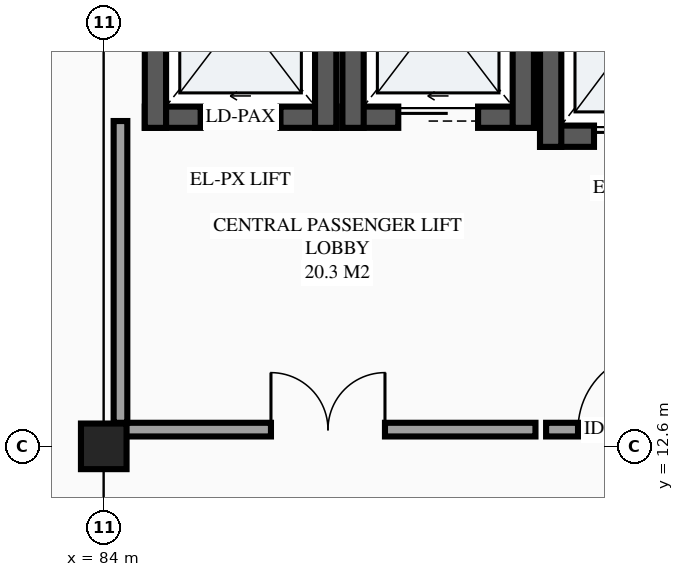
"""IFC4 building model, lengths in metres.
Left out: names, types, materials, properties, quantities, classifications, styles, units other than length and angle.
Written with IfcOpenShell. Run it as: python <this file> out.ifc"""

import sys

from ifc_helpers import new_model, si_unit, direction, frame, frame_2d, origin, origin_2d, place, context, subcontext, project, spatial, rectangle, extrude, element, fill, save


model = new_model("IFC4")
c1 = context("Model", 3, precision=1e-05, world=origin(), true_north=direction((0.0, 1.0)))
c2 = subcontext(c1, "Body", "Model", "MODEL_VIEW")
j1 = project(units=[si_unit("LENGTHUNIT", "METRE"), si_unit("PLANEANGLEUNIT", "RADIAN")], contexts=[c1])
p1 = place(None, origin())
s1 = spatial("IfcSite", under=j1, at=p1, CompositionType="ELEMENT")
p2 = place(p1, origin())
s2 = spatial("IfcBuilding", under=s1, at=p2, CompositionType="ELEMENT")
p3 = place(p2, frame((0.0, 0.0, 25.5)))
s3 = spatial("IfcBuildingStorey", under=s2, at=p3, CompositionType="ELEMENT", Elevation=25.5)
p4 = place(p3, frame((84.0, 12.6, 0.0), z_axis=(0.0, 0.0, 1.0), x_axis=(1.0, 0.0, 0.0)))
e1 = element("IfcColumn", 1, at=p4, inside=s3, PredefinedType="COLUMN", context=c2, shape_type="SweptSolid", body=[
    extrude(rectangle(XDim=0.6, YDim=0.6, at=origin_2d()), origin(), (0.0, 0.0, 1.0), 3.6),
])
p5 = place(p3, frame((84.54, 16.93, 0.0), z_axis=(0.0, 0.0, 1.0), x_axis=(1.0, 0.0, 0.0)))
e2 = element("IfcWall", 2, at=p5, inside=s3, PredefinedType="SHEAR", context=c2, shape_type="SweptSolid", body=[
    extrude(rectangle(XDim=2.52, YDim=0.28, at=frame_2d((1.26, 0.0))), origin(), (0.0, 0.0, 1.0), 3.6),
])
p6 = place(p5, frame((0.735, 0.0, 0.0)))
e3 = element("IfcOpeningElement", 3, at=p6, cuts=e2, PredefinedType="OPENING", context=c2, shape_type="SweptSolid", body=[
    extrude(rectangle(XDim=1.05, YDim=2.2, at=frame_2d((0.525, 1.1))), frame((0.0, 0.15, 0.0), z_axis=(0.0, -1.0, 0.0), x_axis=(1.0, 0.0, 0.0)), (0.0, 0.0, 1.0), 0.3),
])
for number, where, z_axis, x_axis in (
    (4, (86.92, 16.79, 0.0), (0.0, 0.0, 1.0), (0.0, 1.0, 0.0)),
    (5, (84.68, 19.81, 0.0), (0.0, 0.0, 1.0), (0.0, -1.0, 0.0)),
):
    element("IfcWall", number, at=place(p3, frame(where, z_axis=z_axis, x_axis=x_axis)), inside=s3, PredefinedType="SHEAR", context=c2, shape_type="SweptSolid", body=[
        extrude(rectangle(XDim=3.02, YDim=0.28, at=frame_2d((1.51, 0.0))), origin(), (0.0, 0.0, 1.0), 3.6),
    ])
p7 = place(p3, frame((87.14, 16.93, 0.0), z_axis=(0.0, 0.0, 1.0), x_axis=(1.0, 0.0, 0.0)))
e6 = element("IfcWall", 6, at=p7, inside=s3, PredefinedType="SHEAR", context=c2, shape_type="SweptSolid", body=[
    extrude(rectangle(XDim=2.52, YDim=0.28, at=frame_2d((1.26, 0.0))), origin(), (0.0, 0.0, 1.0), 3.6),
])
p8 = place(p7, frame((0.735, 0.0, 0.0)))
e7 = element("IfcOpeningElement", 7, at=p8, cuts=e6, PredefinedType="OPENING", context=c2, shape_type="SweptSolid", body=[
    extrude(rectangle(XDim=1.05, YDim=2.2, at=frame_2d((0.525, 1.1))), frame((0.0, 0.15, 0.0), z_axis=(0.0, -1.0, 0.0), x_axis=(1.0, 0.0, 0.0)), (0.0, 0.0, 1.0), 0.3),
])
for number, where, z_axis, x_axis in (
    (8, (89.52, 16.79, 0.0), (0.0, 0.0, 1.0), (0.0, 1.0, 0.0)),
    (9, (87.28, 19.81, 0.0), (0.0, 0.0, 1.0), (0.0, -1.0, 0.0)),
):
    element("IfcWall", number, at=place(p3, frame(where, z_axis=z_axis, x_axis=x_axis)), inside=s3, PredefinedType="SHEAR", context=c2, shape_type="SweptSolid", body=[
        extrude(rectangle(XDim=3.02, YDim=0.28, at=frame_2d((1.51, 0.0))), origin(), (0.0, 0.0, 1.0), 3.6),
    ])
p9 = place(p3, frame((89.74, 16.68, 0.0), z_axis=(0.0, 0.0, 1.0), x_axis=(1.0, 0.0, 0.0)))
e10 = element("IfcWall", 10, at=p9, inside=s3, PredefinedType="SHEAR", context=c2, shape_type="SweptSolid", body=[
    extrude(rectangle(XDim=2.72, YDim=0.28, at=frame_2d((1.36, 0.0))), origin(), (0.0, 0.0, 1.0), 3.6),
])
p10 = place(p9, frame((0.71, 0.0, 0.0)))
e11 = element("IfcOpeningElement", 11, at=p10, cuts=e10, PredefinedType="OPENING", context=c2, shape_type="SweptSolid", body=[
    extrude(rectangle(XDim=1.3, YDim=2.25, at=frame_2d((0.65, 1.125))), frame((0.0, 0.15, 0.0), z_axis=(0.0, -1.0, 0.0), x_axis=(1.0, 0.0, 0.0)), (0.0, 0.0, 1.0), 0.3),
])
p11 = place(p3, frame((89.88, 19.86, 0.0), z_axis=(0.0, 0.0, 1.0), x_axis=(0.0, -1.0, 0.0)))
e12 = element("IfcWall", 12, at=p11, inside=s3, PredefinedType="SHEAR", context=c2, shape_type="SweptSolid", body=[
    extrude(rectangle(XDim=3.32, YDim=0.28, at=frame_2d((1.66, 0.0))), origin(), (0.0, 0.0, 1.0), 3.6),
])
p12 = place(p3, frame((84.22, 12.82, 0.0), z_axis=(0.0, 0.0, 1.0), x_axis=(1.0, 0.0, 0.0)))
e13 = element("IfcWall", 13, at=p12, inside=s3, PredefinedType="PARTITIONING", context=c2, shape_type="SweptSolid", body=[
    extrude(rectangle(XDim=5.46, YDim=0.18, at=frame_2d((2.73, 0.0))), origin(), (0.0, 0.0, 1.0), 3.375),
])
p13 = place(p12, frame((1.98, 0.0, 0.0)))
e14 = element("IfcOpeningElement", 14, at=p13, cuts=e13, PredefinedType="OPENING", context=c2, shape_type="SweptSolid", body=[
    extrude(rectangle(XDim=1.5, YDim=2.15, at=frame_2d((0.75, 1.075))), frame((0.0, 0.1, 0.0), z_axis=(0.0, -1.0, 0.0), x_axis=(1.0, 0.0, 0.0)), (0.0, 0.0, 1.0), 0.2),
])
p14 = place(p3, frame((84.22, 12.91, 0.0), z_axis=(0.0, 0.0, 1.0), x_axis=(0.0, 1.0, 0.0)))
e15 = element("IfcWall", 15, at=p14, inside=s3, PredefinedType="PARTITIONING", context=c2, shape_type="SweptSolid", body=[
    extrude(rectangle(XDim=3.97, YDim=0.18, at=frame_2d((1.985, 0.0))), origin(), (0.0, 0.0, 1.0), 2.53),
])
p15 = place(p3, frame((89.82, 12.82, 0.0), z_axis=(0.0, 0.0, 1.0), x_axis=(1.0, 0.0, 0.0)))
e16 = element("IfcWall", 16, at=p15, inside=s3, PredefinedType="PARTITIONING", context=c2, shape_type="SweptSolid", body=[
    extrude(rectangle(XDim=3.96, YDim=0.18, at=frame_2d((1.98, 0.0))), origin(), (0.0, 0.0, 1.0), 3.375),
])
p16 = place(p15, frame((0.42, 0.0, 0.0)))
e17 = element("IfcOpeningElement", 17, at=p16, cuts=e16, PredefinedType="OPENING", context=c2, shape_type="SweptSolid", body=[
    extrude(rectangle(XDim=1.02, YDim=2.15, at=frame_2d((0.51, 1.075))), frame((0.0, 0.1, 0.0), z_axis=(0.0, -1.0, 0.0), x_axis=(1.0, 0.0, 0.0)), (0.0, 0.0, 1.0), 0.2),
])
p17 = place(p6, origin())
e18 = element("IfcDoor", 18, at=p17, inside=s3, OperationType="SLIDING_TO_LEFT", PredefinedType="DOOR", context=c2, shape_type="SweptSolid", body=[
    extrude(rectangle(XDim=1.05, YDim=2.2, at=frame_2d((0.525, 1.1))), frame((0.0, 0.025, 0.0), z_axis=(0.0, -1.0, 0.0), x_axis=(1.0, 0.0, 0.0)), (0.0, 0.0, 1.0), 0.05),
])
fill(e3, e18)
p18 = place(p8, origin())
e19 = element("IfcDoor", 19, at=p18, inside=s3, OperationType="SLIDING_TO_LEFT", PredefinedType="DOOR", context=c2, shape_type="SweptSolid", body=[
    extrude(rectangle(XDim=1.05, YDim=2.2, at=frame_2d((0.525, 1.1))), frame((0.0, 0.025, 0.0), z_axis=(0.0, -1.0, 0.0), x_axis=(1.0, 0.0, 0.0)), (0.0, 0.0, 1.0), 0.05),
])
fill(e7, e19)
p19 = place(p10, origin())
e20 = element("IfcDoor", 20, at=p19, inside=s3, OperationType="SLIDING_TO_LEFT", PredefinedType="DOOR", context=c2, shape_type="SweptSolid", body=[
    extrude(rectangle(XDim=1.3, YDim=2.25, at=frame_2d((0.65, 1.125))), frame((0.0, 0.025, 0.0), z_axis=(0.0, -1.0, 0.0), x_axis=(1.0, 0.0, 0.0)), (0.0, 0.0, 1.0), 0.05),
])
fill(e11, e20)
p20 = place(p13, origin())
e21 = element("IfcDoor", 21, at=p20, inside=s3, OperationType="DOUBLE_DOOR_SINGLE_SWING", PredefinedType="DOOR", context=c2, shape_type="SweptSolid", body=[
    extrude(rectangle(XDim=1.5, YDim=2.15, at=frame_2d((0.75, 1.075))), frame((0.0, 0.025, 0.0), z_axis=(0.0, -1.0, 0.0), x_axis=(1.0, 0.0, 0.0)), (0.0, 0.0, 1.0), 0.05),
])
fill(e14, e21)
p21 = place(p16, origin())
e22 = element("IfcDoor", 22, at=p21, inside=s3, OperationType="SINGLE_SWING_RIGHT", PredefinedType="DOOR", context=c2, shape_type="SweptSolid", body=[
    extrude(rectangle(XDim=1.02, YDim=2.15, at=frame_2d((0.51, 1.075))), frame((0.0, 0.025, 0.0), z_axis=(0.0, -1.0, 0.0), x_axis=(1.0, 0.0, 0.0)), (0.0, 0.0, 1.0), 0.05),
])
fill(e17, e22)
save(model, sys.argv[1])
